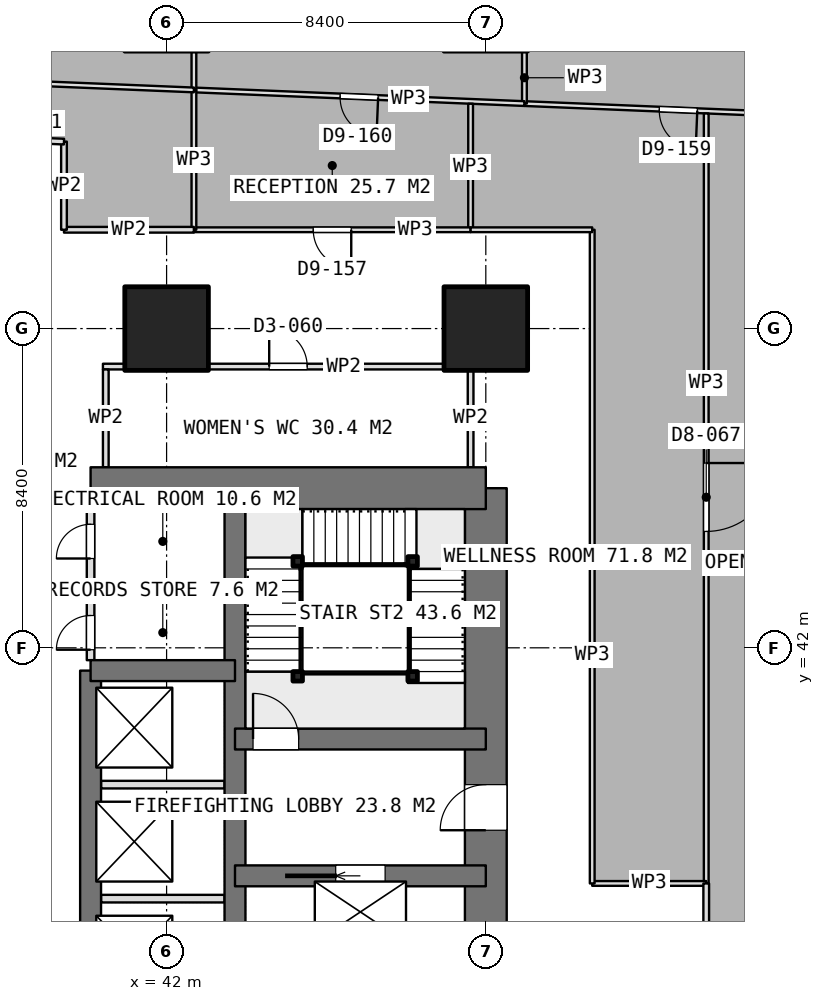
"""IFC4 building model, lengths in metres.
Left out: names, types, materials, properties, quantities, classifications, styles, units other than length and angle.
Written with IfcOpenShell. Run it as: python <this file> out.ifc"""

import sys

from ifc_helpers import new_model, si_unit, direction, frame, frame_2d, origin, origin_2d, place, context, subcontext, project, spatial, rectangle, extrude, element, fill, save


model = new_model("IFC4")
c1 = context("Model", 3, precision=1e-05, world=origin(), true_north=direction((0.0, 1.0)))
c2 = subcontext(c1, "Body", "Model", "MODEL_VIEW")
j1 = project(units=[si_unit("LENGTHUNIT", "METRE"), si_unit("PLANEANGLEUNIT", "RADIAN")], contexts=[c1])
p1 = place(None, origin())
s1 = spatial("IfcSite", under=j1, at=p1, CompositionType="ELEMENT")
p2 = place(p1, origin())
s2 = spatial("IfcBuilding", under=s1, at=p2, CompositionType="ELEMENT")
p3 = place(p2, frame((0.0, 0.0, 51.65)))
s3 = spatial("IfcBuildingStorey", under=s2, at=p3, CompositionType="ELEMENT", Elevation=51.65)
p4 = place(p3, frame((40.0, 46.2, 0.0), z_axis=(0.0, 0.0, 1.0), x_axis=(1.0, 0.0, 0.0)))
e1 = element("IfcWall", 1, at=p4, inside=s3, PredefinedType="SHEAR", context=c2, shape_type="SweptSolid", body=[
    extrude(rectangle(XDim=10.4, YDim=1.1, at=frame_2d((5.2, 0.0))), origin(), (0.0, 0.0, 1.0), 3.75),
])
p5 = place(p3, frame((50.4, 21.0, 0.0), z_axis=(0.0, 0.0, 1.0), x_axis=(0.0, 1.0, 0.0)))
e2 = element("IfcWall", 2, at=p5, inside=s3, PredefinedType="SHEAR", context=c2, shape_type="SweptSolid", body=[
    extrude(rectangle(XDim=25.2, YDim=1.1, at=frame_2d((12.6, 0.0))), origin(), (0.0, 0.0, 1.0), 3.75),
])
p6 = place(p5, frame((16.2, 0.0, 0.0)))
e3 = element("IfcOpeningElement", 3, at=p6, cuts=e2, PredefinedType="OPENING", context=c2, shape_type="SweptSolid", body=[
    extrude(rectangle(XDim=1.2, YDim=2.1, at=frame_2d((0.6, 1.05))), frame((0.0, 0.56, 0.0), z_axis=(0.0, -1.0, 0.0), x_axis=(1.0, 0.0, 0.0)), (0.0, 0.0, 1.0), 1.12),
])
p7 = place(p5, frame((10.05, 0.0, 0.0)))
e4 = element("IfcOpeningElement", 4, at=p7, cuts=e2, PredefinedType="OPENING", context=c2, shape_type="SweptSolid", body=[
    extrude(rectangle(XDim=0.9, YDim=2.1, at=frame_2d((0.45, 1.05))), frame((0.0, 0.56, 0.0), z_axis=(0.0, -1.0, 0.0), x_axis=(1.0, 0.0, 0.0)), (0.0, 0.0, 1.0), 1.12),
])
p8 = place(p5, frame((7.45, 0.0, 0.0)))
e5 = element("IfcOpeningElement", 5, at=p8, cuts=e2, PredefinedType="OPENING", context=c2, shape_type="SweptSolid", body=[
    extrude(rectangle(XDim=0.9, YDim=2.1, at=frame_2d((0.45, 1.05))), frame((0.0, 0.56, 0.0), z_axis=(0.0, -1.0, 0.0), x_axis=(1.0, 0.0, 0.0)), (0.0, 0.0, 1.0), 1.12),
])
p9 = place(p5, frame((0.75, 0.0, 0.0)))
e6 = element("IfcOpeningElement", 6, at=p9, cuts=e2, PredefinedType="OPENING", context=c2, shape_type="SweptSolid", body=[
    extrude(rectangle(XDim=1.2, YDim=2.1, at=frame_2d((0.6, 1.05))), frame((0.0, 0.56, 0.0), z_axis=(0.0, -1.0, 0.0), x_axis=(1.0, 0.0, 0.0)), (0.0, 0.0, 1.0), 1.12),
])
p10 = place(p3, frame((43.8, 21.0, 0.0), z_axis=(0.0, 0.0, 1.0), x_axis=(0.0, 1.0, 0.0)))
e7 = element("IfcWall", 7, at=p10, inside=s3, PredefinedType="SHEAR", context=c2, shape_type="SweptSolid", body=[
    extrude(rectangle(XDim=25.2, YDim=0.55, at=frame_2d((12.6, 0.0))), origin(), (0.0, 0.0, 1.0), 3.75),
])
p11 = place(p3, frame((40.0, 23.4, 0.0), z_axis=(0.0, 0.0, 1.0), x_axis=(0.0, 1.0, 0.0)))
e8 = element("IfcWall", 8, at=p11, inside=s3, PredefinedType="SHEAR", context=c2, shape_type="SweptSolid", body=[
    extrude(rectangle(XDim=18.0, YDim=0.55, at=frame_2d((9.0, 0.0))), origin(), (0.0, 0.0, 1.0), 3.75),
])
p12 = place(p3, frame((40.0, 41.4, 0.0), z_axis=(0.0, 0.0, 1.0), x_axis=(1.0, 0.0, 0.0)))
e9 = element("IfcWall", 9, at=p12, inside=s3, PredefinedType="SHEAR", context=c2, shape_type="SweptSolid", body=[
    extrude(rectangle(XDim=3.8, YDim=0.55, at=frame_2d((1.9, 0.0))), origin(), (0.0, 0.0, 1.0), 3.75),
])
p13 = place(p3, frame((43.8, 36.0, 0.0), z_axis=(0.0, 0.0, 1.0), x_axis=(1.0, 0.0, 0.0)))
e10 = element("IfcWall", 10, at=p13, inside=s3, PredefinedType="SHEAR", context=c2, shape_type="SweptSolid", body=[
    extrude(rectangle(XDim=6.6, YDim=0.55, at=frame_2d((3.3, 0.0))), origin(), (0.0, 0.0, 1.0), 3.75),
])
p14 = place(p13, frame((2.65, 0.0, 0.0)))
e11 = element("IfcOpeningElement", 11, at=p14, cuts=e10, PredefinedType="OPENING", context=c2, shape_type="SweptSolid", body=[
    extrude(rectangle(XDim=1.3, YDim=2.1, at=frame_2d((0.65, 1.05))), frame((0.0, 0.285, 0.0), z_axis=(0.0, -1.0, 0.0), x_axis=(1.0, 0.0, 0.0)), (0.0, 0.0, 1.0), 0.57),
])
p15 = place(p3, frame((43.8, 39.6, 0.0), z_axis=(0.0, 0.0, 1.0), x_axis=(1.0, 0.0, 0.0)))
e12 = element("IfcWall", 12, at=p15, inside=s3, PredefinedType="SHEAR", context=c2, shape_type="SweptSolid", body=[
    extrude(rectangle(XDim=6.6, YDim=0.55, at=frame_2d((3.3, 0.0))), origin(), (0.0, 0.0, 1.0), 3.75),
])
p16 = place(p15, frame((0.475, 0.0, 0.0)))
e13 = element("IfcOpeningElement", 13, at=p16, cuts=e12, PredefinedType="OPENING", context=c2, shape_type="SweptSolid", body=[
    extrude(rectangle(XDim=1.2, YDim=2.1, at=frame_2d((0.6, 1.05))), frame((0.0, 0.285, 0.0), z_axis=(0.0, -1.0, 0.0), x_axis=(1.0, 0.0, 0.0)), (0.0, 0.0, 1.0), 0.57),
])
for number, where, z_axis, x_axis in (
    (14, (42.0, 50.4, 0.0), (0.0, 0.0, 1.0), (1.0, 0.0, 0.0)),
    (15, (50.4, 50.4, 0.0), (0.0, 0.0, 1.0), (1.0, 0.0, 0.0)),
):
    element("IfcColumn", number, at=place(p3, frame(where, z_axis=z_axis, x_axis=x_axis)), inside=s3, PredefinedType="COLUMN", context=c2, shape_type="SweptSolid", body=[
        extrude(rectangle(XDim=2.2, YDim=2.2, at=origin_2d()), origin(), (0.0, 0.0, 1.0), 3.75),
    ])
for number, where, z_axis, x_axis in (
    (16, (40.275, 35.4, 0.0), (0.0, 0.0, 1.0), (1.0, 0.0, 0.0)),
    (17, (40.275, 38.4, 0.0), (0.0, 0.0, 1.0), (1.0, 0.0, 0.0)),
):
    element("IfcWall", number, at=place(p3, frame(where, z_axis=z_axis, x_axis=x_axis)), inside=s3, PredefinedType="PARTITIONING", context=c2, shape_type="SweptSolid", body=[
        extrude(rectangle(XDim=3.25, YDim=0.2, at=frame_2d((1.625, 0.0))), origin(), (0.0, 0.0, 1.0), 3.5),
    ])
p17 = place(p3, frame((40.0, 41.675, 0.0), z_axis=(0.0, 0.0, 1.0), x_axis=(0.0, 1.0, 0.0)))
e18 = element("IfcWall", 18, at=p17, inside=s3, PredefinedType="PARTITIONING", context=c2, shape_type="SweptSolid", body=[
    extrude(rectangle(XDim=3.975, YDim=0.2, at=frame_2d((1.987, 0.0))), origin(), (0.0, 0.0, 1.0), 3.5),
])
p18 = place(p17, frame((2.675, 0.0, 0.0)))
e19 = element("IfcOpeningElement", 19, at=p18, cuts=e18, PredefinedType="OPENING", context=c2, shape_type="SweptSolid", body=[
    extrude(rectangle(XDim=0.9, YDim=2.1, at=frame_2d((0.45, 1.05))), frame((0.0, 0.11, 0.0), z_axis=(0.0, -1.0, 0.0), x_axis=(1.0, 0.0, 0.0)), (0.0, 0.0, 1.0), 0.22),
])
p19 = place(p17, frame((0.275, 0.0, 0.0)))
e20 = element("IfcOpeningElement", 20, at=p19, cuts=e18, PredefinedType="OPENING", context=c2, shape_type="SweptSolid", body=[
    extrude(rectangle(XDim=0.9, YDim=2.1, at=frame_2d((0.45, 1.05))), frame((0.0, 0.11, 0.0), z_axis=(0.0, -1.0, 0.0), x_axis=(1.0, 0.0, 0.0)), (0.0, 0.0, 1.0), 0.22),
])
p20 = place(p3, frame((40.0, 43.4, 0.0), z_axis=(0.0, 0.0, 1.0), x_axis=(1.0, 0.0, 0.0)))
e21 = element("IfcWall", 21, at=p20, inside=s3, PredefinedType="PARTITIONING", context=c2, shape_type="SweptSolid", body=[
    extrude(rectangle(XDim=3.525, YDim=0.2, at=frame_2d((1.762, 0.0))), origin(), (0.0, 0.0, 1.0), 3.5),
])
p21 = place(p3, frame((40.325, 49.4, 0.0), z_axis=(0.0, 0.0, 1.0), x_axis=(1.0, 0.0, 0.0)))
e22 = element("IfcWall", 22, at=p21, inside=s3, PredefinedType="PARTITIONING", context=c2, shape_type="SweptSolid", body=[
    extrude(rectangle(XDim=9.75, YDim=0.15, at=frame_2d((4.875, 0.0))), origin(), (0.0, 0.0, 1.0), 3.5),
])
p22 = place(p21, frame((4.375, 0.0, 0.0)))
e23 = element("IfcOpeningElement", 23, at=p22, cuts=e22, PredefinedType="OPENING", context=c2, shape_type="SweptSolid", body=[
    extrude(rectangle(XDim=1.0, YDim=2.1, at=frame_2d((0.5, 1.05))), frame((0.0, 0.085, 0.0), z_axis=(0.0, -1.0, 0.0), x_axis=(1.0, 0.0, 0.0)), (0.0, 0.0, 1.0), 0.17),
])
for number, where, z_axis, x_axis in (
    (24, (40.4, 46.75, 0.0), (0.0, 0.0, 1.0), (0.0, 1.0, 0.0)),
    (25, (50.0, 46.75, 0.0), (0.0, 0.0, 1.0), (0.0, 1.0, 0.0)),
):
    element("IfcWall", number, at=place(p3, frame(where, z_axis=z_axis, x_axis=x_axis)), inside=s3, PredefinedType="PARTITIONING", context=c2, shape_type="SweptSolid", body=[
        extrude(rectangle(XDim=2.575, YDim=0.15, at=frame_2d((1.288, 0.0))), origin(), (0.0, 0.0, 1.0), 3.5),
    ])
p23 = place(p3, frame((60.111, 55.962, 0.0), z_axis=(0.0, 0.0, 1.0), x_axis=(-0.999152748928, 0.041155610913, 0.0)))
e26 = element("IfcWall", 26, at=p23, inside=s3, PredefinedType="PARTITIONING", context=c2, shape_type="SweptSolid", body=[
    extrude(rectangle(XDim=8.702, YDim=0.125, at=frame_2d((4.351, 0.0))), origin(), (0.0, 0.0, 1.0), 3.5),
])
p24 = place(p23, frame((4.15, 0.0, 0.0)))
e27 = element("IfcOpeningElement", 27, at=p24, cuts=e26, PredefinedType="OPENING", context=c2, shape_type="SweptSolid", body=[
    extrude(rectangle(XDim=1.0, YDim=2.1, at=frame_2d((0.5, 1.05))), frame((0.0, 0.073, 0.0), z_axis=(0.0, -1.0, 0.0), x_axis=(1.0, 0.0, 0.0)), (0.0, 0.0, 1.0), 0.145),
])
p25 = place(p3, frame((51.416, 56.32, 0.0), z_axis=(0.0, 0.0, 1.0), x_axis=(0.0, 1.0, 0.0)))
e28 = element("IfcWall", 28, at=p25, inside=s3, PredefinedType="PARTITIONING", context=c2, shape_type="SweptSolid", body=[
    extrude(rectangle(XDim=1.36, YDim=0.125, at=frame_2d((0.68, 0.0))), origin(), (0.0, 0.0, 1.0), 3.5),
])
p26 = place(p3, frame((51.415, 56.32, 0.0), z_axis=(0.0, 0.0, 1.0), x_axis=(-0.999149475386, 0.041235007407, 0.0)))
e29 = element("IfcWall", 29, at=p26, inside=s3, PredefinedType="PARTITIONING", context=c2, shape_type="SweptSolid", body=[
    extrude(rectangle(XDim=8.703, YDim=0.125, at=frame_2d((4.352, 0.0))), origin(), (0.0, 0.0, 1.0), 3.5),
])
p27 = place(p26, frame((3.852, 0.0, 0.0)))
e30 = element("IfcOpeningElement", 30, at=p27, cuts=e29, PredefinedType="OPENING", context=c2, shape_type="SweptSolid", body=[
    extrude(rectangle(XDim=1.0, YDim=2.1, at=frame_2d((0.5, 1.05))), frame((0.0, 0.073, 0.0), z_axis=(0.0, -1.0, 0.0), x_axis=(1.0, 0.0, 0.0)), (0.0, 0.0, 1.0), 0.145),
])
p28 = place(p3, frame((42.719, 56.679, 0.0), z_axis=(0.0, 0.0, 1.0), x_axis=(0.0, 1.0, 0.0)))
e31 = element("IfcWall", 31, at=p28, inside=s3, PredefinedType="PARTITIONING", context=c2, shape_type="SweptSolid", body=[
    extrude(rectangle(XDim=1.001, YDim=0.125, at=frame_2d((0.5, 0.0))), origin(), (0.0, 0.0, 1.0), 3.5),
])
p29 = place(p3, frame((50.0, 56.316, 0.0), z_axis=(0.0, 0.0, 1.0), x_axis=(0.0, -1.0, 0.0)))
e32 = element("IfcWall", 32, at=p29, inside=s3, PredefinedType="PARTITIONING", context=c2, shape_type="SweptSolid", body=[
    extrude(rectangle(XDim=3.316, YDim=0.125, at=frame_2d((1.658, 0.0))), origin(), (0.0, 0.0, 1.0), 3.5),
])
p30 = place(p3, frame((50.0, 53.0, 0.0), z_axis=(0.0, 0.0, 1.0), x_axis=(-1.0, 0.0, 0.0)))
e33 = element("IfcWall", 33, at=p30, inside=s3, PredefinedType="PARTITIONING", context=c2, shape_type="SweptSolid", body=[
    extrude(rectangle(XDim=7.281, YDim=0.125, at=frame_2d((3.641, 0.0))), origin(), (0.0, 0.0, 1.0), 3.5),
])
p31 = place(p30, frame((3.141, 0.0, 0.0)))
e34 = element("IfcOpeningElement", 34, at=p31, cuts=e33, PredefinedType="OPENING", context=c2, shape_type="SweptSolid", body=[
    extrude(rectangle(XDim=1.0, YDim=2.1, at=frame_2d((0.5, 1.05))), frame((0.0, 0.073, 0.0), z_axis=(0.0, -1.0, 0.0), x_axis=(1.0, 0.0, 0.0)), (0.0, 0.0, 1.0), 0.145),
])
p32 = place(p3, frame((42.719, 53.0, 0.0), z_axis=(0.0, 0.0, 1.0), x_axis=(0.0, 1.0, 0.0)))
e35 = element("IfcWall", 35, at=p32, inside=s3, PredefinedType="PARTITIONING", context=c2, shape_type="SweptSolid", body=[
    extrude(rectangle(XDim=3.679, YDim=0.125, at=frame_2d((1.839, 0.0))), origin(), (0.0, 0.0, 1.0), 3.5),
])
p33 = place(p3, frame((56.2, 56.06, 0.0), z_axis=(0.0, 0.0, 1.0), x_axis=(0.0, -1.0, 0.0)))
e36 = element("IfcWall", 36, at=p33, inside=s3, PredefinedType="PARTITIONING", context=c2, shape_type="SweptSolid", body=[
    extrude(rectangle(XDim=20.26, YDim=0.125, at=frame_2d((10.13, 0.0))), origin(), (0.0, 0.0, 1.0), 3.5),
])
p34 = place(p33, frame((9.198, 0.0, 0.0)))
e37 = element("IfcOpeningElement", 37, at=p34, cuts=e36, PredefinedType="OPENING", context=c2, shape_type="SweptSolid", body=[
    extrude(rectangle(XDim=1.8, YDim=2.1, at=frame_2d((0.9, 1.05))), frame((0.0, 0.073, 0.0), z_axis=(0.0, -1.0, 0.0), x_axis=(1.0, 0.0, 0.0)), (0.0, 0.0, 1.0), 0.145),
])
p35 = place(p3, frame((56.2, 35.8, 0.0), z_axis=(0.0, 0.0, 1.0), x_axis=(-1.0, 0.0, 0.0)))
e38 = element("IfcWall", 38, at=p35, inside=s3, PredefinedType="PARTITIONING", context=c2, shape_type="SweptSolid", body=[
    extrude(rectangle(XDim=3.0, YDim=0.125, at=frame_2d((1.5, 0.0))), origin(), (0.0, 0.0, 1.0), 3.5),
])
p36 = place(p3, frame((53.2, 35.8, 0.0), z_axis=(0.0, 0.0, 1.0), x_axis=(0.0, 1.0, 0.0)))
e39 = element("IfcWall", 39, at=p36, inside=s3, PredefinedType="PARTITIONING", context=c2, shape_type="SweptSolid", body=[
    extrude(rectangle(XDim=17.2, YDim=0.125, at=frame_2d((8.6, 0.0))), origin(), (0.0, 0.0, 1.0), 3.5),
])
p37 = place(p3, frame((53.2, 53.0, 0.0), z_axis=(0.0, 0.0, 1.0), x_axis=(-1.0, 0.0, 0.0)))
e40 = element("IfcWall", 40, at=p37, inside=s3, PredefinedType="PARTITIONING", context=c2, shape_type="SweptSolid", body=[
    extrude(rectangle(XDim=3.2, YDim=0.125, at=frame_2d((1.6, 0.0))), origin(), (0.0, 0.0, 1.0), 3.5),
])
p38 = place(p3, frame((56.2, 31.2, 0.0), z_axis=(0.0, 0.0, 1.0), x_axis=(0.0, 1.0, 0.0)))
e41 = element("IfcWall", 41, at=p38, inside=s3, PredefinedType="PARTITIONING", context=c2, shape_type="SweptSolid", body=[
    extrude(rectangle(XDim=4.6, YDim=0.15, at=frame_2d((2.3, 0.0))), origin(), (0.0, 0.0, 1.0), 3.5),
])
p39 = place(p3, frame((42.718, 56.679, 0.0), z_axis=(0.0, 0.0, 1.0), x_axis=(-0.999152748928, 0.041155610913, 0.0)))
e42 = element("IfcWall", 42, at=p39, inside=s3, PredefinedType="PARTITIONING", context=c2, shape_type="SweptSolid", body=[
    extrude(rectangle(XDim=8.702, YDim=0.125, at=frame_2d((4.351, 0.0))), origin(), (0.0, 0.0, 1.0), 3.5),
])
p40 = place(p39, frame((3.851, 0.0, 0.0)))
e43 = element("IfcOpeningElement", 43, at=p40, cuts=e42, PredefinedType="OPENING", context=c2, shape_type="SweptSolid", body=[
    extrude(rectangle(XDim=1.0, YDim=2.1, at=frame_2d((0.5, 1.05))), frame((0.0, 0.073, 0.0), z_axis=(0.0, -1.0, 0.0), x_axis=(1.0, 0.0, 0.0)), (0.0, 0.0, 1.0), 0.145),
])
p41 = place(p3, frame((42.718, 53.0, 0.0), z_axis=(0.0, 0.0, 1.0), x_axis=(-1.0, 0.0, 0.0)))
e44 = element("IfcWall", 44, at=p41, inside=s3, PredefinedType="PARTITIONING", context=c2, shape_type="SweptSolid", body=[
    extrude(rectangle(XDim=3.418, YDim=0.15, at=frame_2d((1.709, 0.0))), origin(), (0.0, 0.0, 1.0), 3.5),
])
p42 = place(p3, frame((39.3, 53.0, 0.0), z_axis=(0.0, 0.0, 1.0), x_axis=(0.0, 1.0, 0.0)))
e45 = element("IfcWall", 45, at=p42, inside=s3, PredefinedType="PARTITIONING", context=c2, shape_type="SweptSolid", body=[
    extrude(rectangle(XDim=2.319, YDim=0.15, at=frame_2d((1.16, 0.0))), origin(), (0.0, 0.0, 1.0), 3.5),
])
p43 = place(p3, frame((39.3, 55.319, 0.0), z_axis=(0.0, 0.0, 1.0), x_axis=(-0.999163245212, 0.040899992866, 0.0)))
e46 = element("IfcWall", 46, at=p43, inside=s3, PredefinedType="PARTITIONING", context=c2, shape_type="SweptSolid", body=[
    extrude(rectangle(XDim=3.002, YDim=0.15, at=frame_2d((1.501, 0.0))), origin(), (0.0, 0.0, 1.0), 3.5),
])
for number, where, z_axis, x_axis in (
    (47, (45.45, 41.25, 0.0), (0.0, 0.0, 1.0), (1.0, 0.0, 0.0)),
    (48, (45.45, 44.275, 0.0), (0.0, 0.0, 1.0), (1.0, 0.0, 0.0)),
    (49, (48.475, 44.275, 0.0), (0.0, 0.0, 1.0), (1.0, 0.0, 0.0)),
    (50, (48.475, 41.25, 0.0), (0.0, 0.0, 1.0), (1.0, 0.0, 0.0)),
):
    element("IfcColumn", number, at=place(p3, frame(where, z_axis=z_axis, x_axis=x_axis)), inside=s3, PredefinedType="COLUMN", context=c2, shape_type="SweptSolid", body=[
        extrude(rectangle(XDim=0.25, YDim=0.25, at=origin_2d()), origin(), (0.0, 0.0, 1.0), 3.75),
    ])
p44 = place(p6, origin())
e51 = element("IfcDoor", 51, at=p44, inside=s3, OperationType="SINGLE_SWING_LEFT", PredefinedType="DOOR", context=c2, shape_type="SweptSolid", body=[
    extrude(rectangle(XDim=1.2, YDim=2.1, at=frame_2d((0.6, 1.05))), frame((0.0, 0.025, 0.0), z_axis=(0.0, -1.0, 0.0), x_axis=(1.0, 0.0, 0.0)), (0.0, 0.0, 1.0), 0.05),
])
fill(e3, e51)
p45 = place(p18, origin())
e52 = element("IfcDoor", 52, at=p45, inside=s3, OperationType="SINGLE_SWING_LEFT", PredefinedType="DOOR", context=c2, shape_type="SweptSolid", body=[
    extrude(rectangle(XDim=0.9, YDim=2.1, at=frame_2d((0.45, 1.05))), frame((0.0, 0.025, 0.0), z_axis=(0.0, -1.0, 0.0), x_axis=(1.0, 0.0, 0.0)), (0.0, 0.0, 1.0), 0.05),
])
fill(e19, e52)
p46 = place(p19, origin())
e53 = element("IfcDoor", 53, at=p46, inside=s3, OperationType="SINGLE_SWING_LEFT", PredefinedType="DOOR", context=c2, shape_type="SweptSolid", body=[
    extrude(rectangle(XDim=0.9, YDim=2.1, at=frame_2d((0.45, 1.05))), frame((0.0, 0.025, 0.0), z_axis=(0.0, -1.0, 0.0), x_axis=(1.0, 0.0, 0.0)), (0.0, 0.0, 1.0), 0.05),
])
fill(e20, e53)
p47 = place(p14, origin())
e54 = element("IfcDoor", 54, at=p47, inside=s3, OperationType="SLIDING_TO_LEFT", PredefinedType="USERDEFINED", context=c2, shape_type="SweptSolid", body=[
    extrude(rectangle(XDim=1.3, YDim=2.1, at=frame_2d((0.65, 1.05))), frame((0.0, 0.025, 0.0), z_axis=(0.0, -1.0, 0.0), x_axis=(1.0, 0.0, 0.0)), (0.0, 0.0, 1.0), 0.05),
])
fill(e11, e54)
p48 = place(p22, origin())
e55 = element("IfcDoor", 55, at=p48, inside=s3, OperationType="SINGLE_SWING_LEFT", PredefinedType="DOOR", context=c2, shape_type="SweptSolid", body=[
    extrude(rectangle(XDim=1.0, YDim=2.1, at=frame_2d((0.5, 1.05))), frame((0.0, 0.025, 0.0), z_axis=(0.0, -1.0, 0.0), x_axis=(1.0, 0.0, 0.0)), (0.0, 0.0, 1.0), 0.05),
])
fill(e23, e55)
p49 = place(p31, origin())
e56 = element("IfcDoor", 56, at=p49, inside=s3, OperationType="SINGLE_SWING_LEFT", PredefinedType="DOOR", context=c2, shape_type="SweptSolid", body=[
    extrude(rectangle(XDim=1.0, YDim=2.1, at=frame_2d((0.5, 1.05))), frame((0.0, 0.025, 0.0), z_axis=(0.0, -1.0, 0.0), x_axis=(1.0, 0.0, 0.0)), (0.0, 0.0, 1.0), 0.05),
])
fill(e34, e56)
p50 = place(p34, origin())
e57 = element("IfcDoor", 57, at=p50, inside=s3, OperationType="DOUBLE_DOOR_SINGLE_SWING", PredefinedType="DOOR", context=c2, shape_type="SweptSolid", body=[
    extrude(rectangle(XDim=1.8, YDim=2.1, at=frame_2d((0.9, 1.05))), frame((0.0, 0.025, 0.0), z_axis=(0.0, -1.0, 0.0), x_axis=(1.0, 0.0, 0.0)), (0.0, 0.0, 1.0), 0.05),
])
fill(e37, e57)
p51 = place(p24, origin())
e58 = element("IfcDoor", 58, at=p51, inside=s3, OperationType="SINGLE_SWING_LEFT", PredefinedType="DOOR", context=c2, shape_type="SweptSolid", body=[
    extrude(rectangle(XDim=1.0, YDim=2.1, at=frame_2d((0.5, 1.05))), frame((0.0, 0.025, 0.0), z_axis=(0.0, -1.0, 0.0), x_axis=(1.0, 0.0, 0.0)), (0.0, 0.0, 1.0), 0.05),
])
fill(e27, e58)
p52 = place(p27, origin())
e59 = element("IfcDoor", 59, at=p52, inside=s3, OperationType="SINGLE_SWING_LEFT", PredefinedType="DOOR", context=c2, shape_type="SweptSolid", body=[
    extrude(rectangle(XDim=1.0, YDim=2.1, at=frame_2d((0.5, 1.05))), frame((0.0, 0.025, 0.0), z_axis=(0.0, -1.0, 0.0), x_axis=(1.0, 0.0, 0.0)), (0.0, 0.0, 1.0), 0.05),
])
fill(e30, e59)
p53 = place(p16, origin())
e60 = element("IfcDoor", 60, at=p53, inside=s3, OperationType="SINGLE_SWING_RIGHT", PredefinedType="DOOR", context=c2, shape_type="SweptSolid", body=[
    extrude(rectangle(XDim=1.2, YDim=2.1, at=frame_2d((0.6, 1.05))), frame((0.0, 0.025, 0.0), z_axis=(0.0, -1.0, 0.0), x_axis=(1.0, 0.0, 0.0)), (0.0, 0.0, 1.0), 0.05),
])
fill(e13, e60)
save(model, sys.argv[1])
